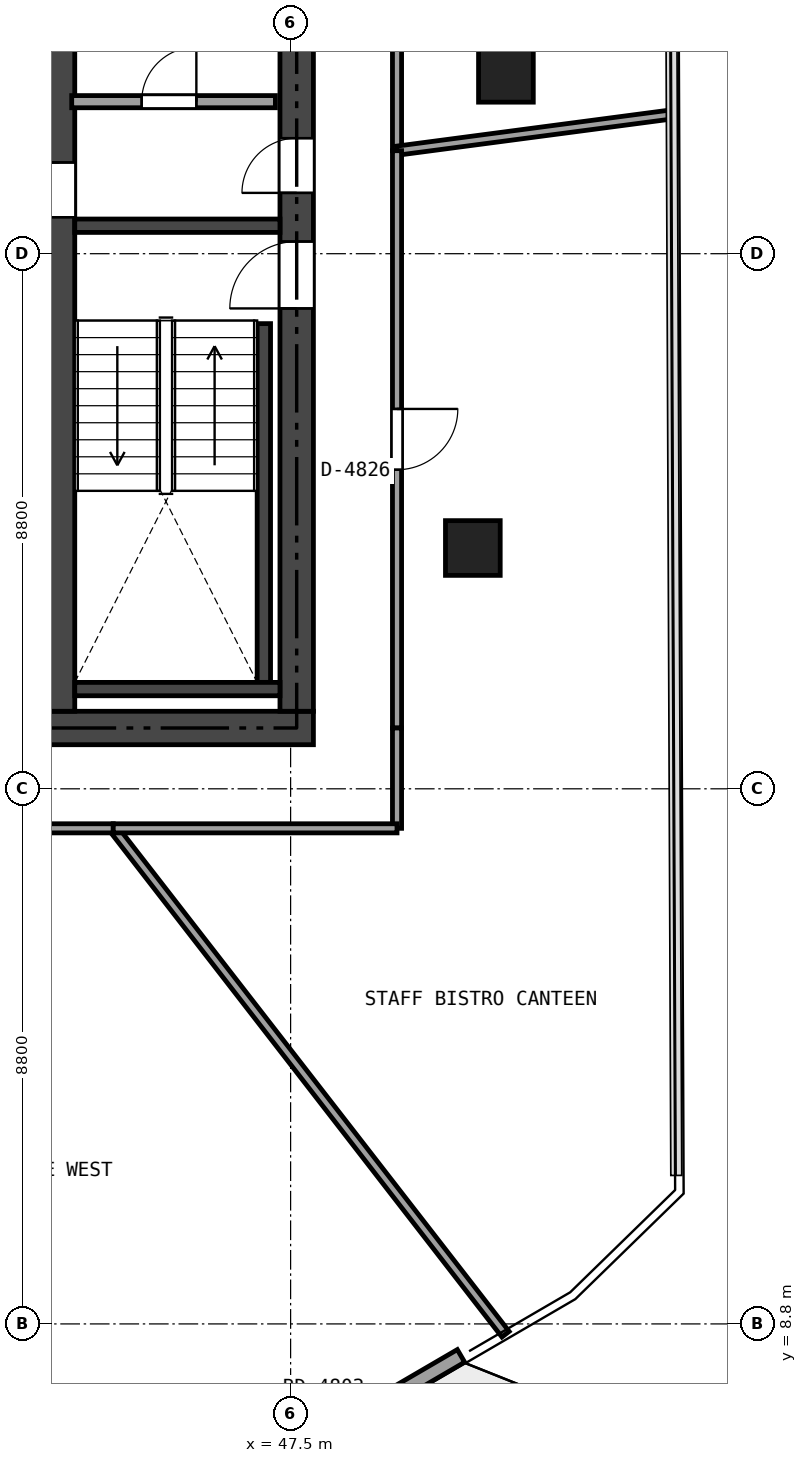
"""IFC4 building model, lengths in metres.
Left out: names, types, materials, properties, quantities, classifications, styles, units other than length and angle.
Written with IfcOpenShell. Run it as: python <this file> out.ifc"""

import sys

from ifc_helpers import new_model, si_unit, direction, frame, frame_2d, origin, origin_2d, place, context, subcontext, project, spatial, rectangle, extrude, element, fill, save


model = new_model("IFC4")
c1 = context("Model", 3, precision=1e-05, world=origin(), true_north=direction((0.0, 1.0)))
c2 = subcontext(c1, "Body", "Model", "MODEL_VIEW")
j1 = project(units=[si_unit("LENGTHUNIT", "METRE"), si_unit("PLANEANGLEUNIT", "RADIAN")], contexts=[c1])
p1 = place(None, origin())
s1 = spatial("IfcSite", under=j1, at=p1, CompositionType="ELEMENT")
p2 = place(p1, origin())
s2 = spatial("IfcBuilding", under=s1, at=p2, CompositionType="ELEMENT")
p3 = place(p2, frame((0.0, 0.0, 180.6)))
s3 = spatial("IfcBuildingStorey", under=s2, at=p3, CompositionType="ELEMENT", Elevation=180.6)
p4 = place(p3, frame((26.525, 18.6, 0.0), z_axis=(0.0, 0.0, 1.0), x_axis=(1.0, 0.0, 0.0)))
e1 = element("IfcWall", 1, at=p4, inside=s3, PredefinedType="SHEAR", context=c2, shape_type="SweptSolid", body=[
    extrude(rectangle(XDim=21.35, YDim=0.55, at=frame_2d((10.675, 0.0))), origin(), (0.0, 0.0, 1.0), 3.32),
])
p5 = place(p4, frame((12.4, 0.0, 0.0)))
e2 = element("IfcOpeningElement", 2, at=p5, cuts=e1, PredefinedType="OPENING", context=c2, shape_type="SweptSolid", body=[
    extrude(rectangle(XDim=1.15, YDim=2.15, at=frame_2d((0.575, 1.075))), frame((0.0, 0.285, 0.0), z_axis=(0.0, -1.0, 0.0), x_axis=(1.0, 0.0, 0.0)), (0.0, 0.0, 1.0), 0.57),
])
p6 = place(p4, frame((5.225, 0.0, 0.0)))
e3 = element("IfcOpeningElement", 3, at=p6, cuts=e1, PredefinedType="OPENING", context=c2, shape_type="SweptSolid", body=[
    extrude(rectangle(XDim=0.9, YDim=2.1, at=frame_2d((0.45, 1.05))), frame((0.0, 0.285, 0.0), z_axis=(0.0, -1.0, 0.0), x_axis=(1.0, 0.0, 0.0)), (0.0, 0.0, 1.0), 0.57),
])
p7 = place(p3, frame((47.6, 18.875, 0.0), z_axis=(0.0, 0.0, 1.0), x_axis=(0.0, 1.0, 0.0)))
e4 = element("IfcWall", 4, at=p7, inside=s3, PredefinedType="SHEAR", context=c2, shape_type="SweptSolid", body=[
    extrude(rectangle(XDim=15.05, YDim=0.55, at=frame_2d((7.525, 0.0))), origin(), (0.0, 0.0, 1.0), 3.32),
])
p8 = place(p7, frame((6.625, 0.0, 0.0)))
e5 = element("IfcOpeningElement", 5, at=p8, cuts=e4, PredefinedType="OPENING", context=c2, shape_type="SweptSolid", body=[
    extrude(rectangle(XDim=1.1, YDim=2.15, at=frame_2d((0.55, 1.075))), frame((0.0, 0.285, 0.0), z_axis=(0.0, -1.0, 0.0), x_axis=(1.0, 0.0, 0.0)), (0.0, 0.0, 1.0), 0.57),
])
p9 = place(p7, frame((8.525, 0.0, 0.0)))
e6 = element("IfcOpeningElement", 6, at=p9, cuts=e4, PredefinedType="OPENING", context=c2, shape_type="SweptSolid", body=[
    extrude(rectangle(XDim=0.9, YDim=2.1, at=frame_2d((0.45, 1.05))), frame((0.0, 0.285, 0.0), z_axis=(0.0, -1.0, 0.0), x_axis=(1.0, 0.0, 0.0)), (0.0, 0.0, 1.0), 0.57),
])
p10 = place(p7, frame((13.175, 0.0, 0.0)))
e7 = element("IfcOpeningElement", 7, at=p10, cuts=e4, PredefinedType="OPENING", context=c2, shape_type="SweptSolid", body=[
    extrude(rectangle(XDim=0.9, YDim=2.1, at=frame_2d((0.45, 1.05))), frame((0.0, 0.285, 0.0), z_axis=(0.0, -1.0, 0.0), x_axis=(1.0, 0.0, 0.0)), (0.0, 0.0, 1.0), 0.57),
])
p11 = place(p3, frame((43.7, 18.875, 0.0), z_axis=(0.0, 0.0, 1.0), x_axis=(0.0, 1.0, 0.0)))
e8 = element("IfcWall", 8, at=p11, inside=s3, PredefinedType="SHEAR", context=c2, shape_type="SweptSolid", body=[
    extrude(rectangle(XDim=15.05, YDim=0.5, at=frame_2d((7.525, 0.0))), origin(), (0.0, 0.0, 1.0), 3.32),
])
p12 = place(p11, frame((8.125, 0.0, 0.0)))
e9 = element("IfcOpeningElement", 9, at=p12, cuts=e8, PredefinedType="OPENING", context=c2, shape_type="SweptSolid", body=[
    extrude(rectangle(XDim=0.9, YDim=2.1, at=frame_2d((0.45, 1.05))), frame((0.0, 0.26, 0.0), z_axis=(0.0, -1.0, 0.0), x_axis=(1.0, 0.0, 0.0)), (0.0, 0.0, 1.0), 0.52),
])
p13 = place(p3, frame((43.95, 26.86, 0.0), z_axis=(0.0, 0.0, 1.0), x_axis=(1.0, 0.0, 0.0)))
e10 = element("IfcWall", 10, at=p13, inside=s3, PredefinedType="SHEAR", context=c2, shape_type="SweptSolid", body=[
    extrude(rectangle(XDim=3.375, YDim=0.22, at=frame_2d((1.688, 0.0))), origin(), (0.0, 0.0, 1.0), 3.32),
])
p14 = place(p3, frame((47.06, 19.35, 0.0), z_axis=(0.0, 0.0, 1.0), x_axis=(0.0, 1.0, 0.0)))
e11 = element("IfcWall", 11, at=p14, inside=s3, PredefinedType="SHEAR", context=c2, shape_type="SweptSolid", body=[
    extrude(rectangle(XDim=5.9, YDim=0.22, at=frame_2d((2.95, 0.0))), origin(), (0.0, 0.0, 1.0), 3.32),
])
p15 = place(p3, frame((43.95, 19.24, 0.0), z_axis=(0.0, 0.0, 1.0), x_axis=(1.0, 0.0, 0.0)))
e12 = element("IfcWall", 12, at=p15, inside=s3, PredefinedType="SHEAR", context=c2, shape_type="SweptSolid", body=[
    extrude(rectangle(XDim=3.375, YDim=0.22, at=frame_2d((1.688, 0.0))), origin(), (0.0, 0.0, 1.0), 3.32),
])
for number, where, z_axis, x_axis in (
    (13, (51.041, 29.342, 0.0), (0.0, 0.0, 1.0), (1.0, 0.0, 0.0)),
    (14, (50.497, 21.56, 0.0), (0.0, 0.0, 1.0), (1.0, 0.0, 0.0)),
):
    element("IfcColumn", number, at=place(p3, frame(where, z_axis=z_axis, x_axis=x_axis)), inside=s3, PredefinedType="COLUMN", context=c2, shape_type="SweptSolid", body=[
        extrude(rectangle(XDim=0.9, YDim=0.9, at=origin_2d()), origin(), (0.0, 0.0, 1.0), 3.32),
    ])
p16 = place(p3, frame((50.302, 8.274, 0.0), z_axis=(0.0, 0.0, 1.0), x_axis=(-0.863902826637, -0.50365852135, 0.0)))
e15 = element("IfcWall", 15, at=p16, inside=s3, PredefinedType="SOLIDWALL", context=c2, shape_type="SweptSolid", body=[
    extrude(rectangle(XDim=4.0, YDim=0.24, at=frame_2d((2.0, 0.0))), origin(), (0.0, 0.0, 1.0), 3.32),
])
p17 = place(p16, frame((1.5, 0.0, 0.0)))
e16 = element("IfcOpeningElement", 16, at=p17, cuts=e15, PredefinedType="OPENING", context=c2, shape_type="SweptSolid", body=[
    extrude(rectangle(XDim=1.0, YDim=2.15, at=frame_2d((0.5, 1.075))), frame((0.0, 0.13, 0.0), z_axis=(0.0, -1.0, 0.0), x_axis=(1.0, 0.0, 0.0)), (0.0, 0.0, 1.0), 0.26),
])
p18 = place(p3, frame((43.9, 28.9, 0.0), z_axis=(0.0, 0.0, 1.0), x_axis=(1.0, 0.0, 0.0)))
e17 = element("IfcWall", 17, at=p18, inside=s3, PredefinedType="SOLIDWALL", context=c2, shape_type="SweptSolid", body=[
    extrude(rectangle(XDim=3.35, YDim=0.2, at=frame_2d((1.675, 0.0))), origin(), (0.0, 0.0, 1.0), 3.32),
])
p19 = place(p18, frame((1.15, 0.0, 0.0)))
e18 = element("IfcOpeningElement", 18, at=p19, cuts=e17, PredefinedType="OPENING", context=c2, shape_type="SweptSolid", body=[
    extrude(rectangle(XDim=0.9, YDim=2.1, at=frame_2d((0.45, 1.05))), frame((0.0, 0.11, 0.0), z_axis=(0.0, -1.0, 0.0), x_axis=(1.0, 0.0, 0.0)), (0.0, 0.0, 1.0), 0.22),
])
p20 = place(p3, frame((49.25, 34.2, 0.0), z_axis=(0.0, 0.0, 1.0), x_axis=(0.0, -1.0, 0.0)))
e19 = element("IfcWall", 19, at=p20, inside=s3, PredefinedType="PARTITIONING", context=c2, shape_type="SweptSolid", body=[
    extrude(rectangle(XDim=6.106, YDim=0.15, at=frame_2d((3.053, 0.0))), origin(), (0.0, 0.0, 1.0), 2.697),
])
p21 = place(p20, frame((2.553, 0.0, 0.0)))
e20 = element("IfcOpeningElement", 20, at=p21, cuts=e19, PredefinedType="OPENING", context=c2, shape_type="SweptSolid", body=[
    extrude(rectangle(XDim=1.0, YDim=2.15, at=frame_2d((0.5, 1.075))), frame((0.0, 0.085, 0.0), z_axis=(0.0, -1.0, 0.0), x_axis=(1.0, 0.0, 0.0)), (0.0, 0.0, 1.0), 0.17),
])
p22 = place(p3, frame((49.25, 28.094, 0.0), z_axis=(0.0, 0.0, 1.0), x_axis=(0.991396749082, 0.130891122349, 0.0)))
e21 = element("IfcWall", 21, at=p22, inside=s3, PredefinedType="PARTITIONING", context=c2, shape_type="SweptSolid", body=[
    extrude(rectangle(XDim=4.6, YDim=0.15, at=frame_2d((2.3, 0.0))), origin(), (0.0, 0.0, 1.0), 2.905),
])
p23 = place(p3, frame((51.035, 8.63, 0.0), z_axis=(0.0, 0.0, 1.0), x_axis=(-0.612800173813, 0.790237905301, 0.0)))
e22 = element("IfcWall", 22, at=p23, inside=s3, PredefinedType="PARTITIONING", context=c2, shape_type="SweptSolid", body=[
    extrude(rectangle(XDim=10.529, YDim=0.15, at=frame_2d((5.264, 0.0))), origin(), (0.0, 0.0, 1.0), 2.841),
])
p24 = place(p3, frame((44.583, 16.95, 0.0), z_axis=(0.0, 0.0, 1.0), x_axis=(-1.0, 0.0, 0.0)))
e23 = element("IfcWall", 23, at=p24, inside=s3, PredefinedType="PARTITIONING", context=c2, shape_type="SweptSolid", body=[
    extrude(rectangle(XDim=10.093, YDim=0.15, at=frame_2d((5.046, 0.0))), origin(), (0.0, 0.0, 1.0), 2.697),
])
p25 = place(p24, frame((4.546, 0.0, 0.0)))
e24 = element("IfcOpeningElement", 24, at=p25, cuts=e23, PredefinedType="OPENING", context=c2, shape_type="SweptSolid", body=[
    extrude(rectangle(XDim=1.0, YDim=2.15, at=frame_2d((0.5, 1.075))), frame((0.0, 0.085, 0.0), z_axis=(0.0, -1.0, 0.0), x_axis=(1.0, 0.0, 0.0)), (0.0, 0.0, 1.0), 0.17),
])
p26 = place(p3, frame((49.25, 28.094, 0.0), z_axis=(0.0, 0.0, 1.0), x_axis=(0.0, -1.0, 0.0)))
e25 = element("IfcWall", 25, at=p26, inside=s3, PredefinedType="PARTITIONING", context=c2, shape_type="SweptSolid", body=[
    extrude(rectangle(XDim=9.494, YDim=0.15, at=frame_2d((4.747, 0.0))), origin(), (0.0, 0.0, 1.0), 2.697),
])
p27 = place(p26, frame((4.247, 0.0, 0.0)))
e26 = element("IfcOpeningElement", 26, at=p27, cuts=e25, PredefinedType="OPENING", context=c2, shape_type="SweptSolid", body=[
    extrude(rectangle(XDim=1.0, YDim=2.15, at=frame_2d((0.5, 1.075))), frame((0.0, 0.085, 0.0), z_axis=(0.0, -1.0, 0.0), x_axis=(1.0, 0.0, 0.0)), (0.0, 0.0, 1.0), 0.17),
])
p28 = place(p3, frame((49.25, 18.6, 0.0), z_axis=(0.0, 0.0, 1.0), x_axis=(0.0, -1.0, 0.0)))
e27 = element("IfcWall", 27, at=p28, inside=s3, PredefinedType="PARTITIONING", context=c2, shape_type="SweptSolid", body=[
    extrude(rectangle(XDim=1.65, YDim=0.15, at=frame_2d((0.825, 0.0))), origin(), (0.0, 0.0, 1.0), 3.32),
])
p29 = place(p3, frame((49.25, 16.95, 0.0), z_axis=(0.0, 0.0, 1.0), x_axis=(-1.0, 0.0, 0.0)))
e28 = element("IfcWall", 28, at=p29, inside=s3, PredefinedType="PARTITIONING", context=c2, shape_type="SweptSolid", body=[
    extrude(rectangle(XDim=4.667, YDim=0.15, at=frame_2d((2.333, 0.0))), origin(), (0.0, 0.0, 1.0), 2.841),
])
p30 = place(p8, origin())
e29 = element("IfcDoor", 29, at=p30, inside=s3, OperationType="SINGLE_SWING_LEFT", PredefinedType="DOOR", context=c2, shape_type="SweptSolid", body=[
    extrude(rectangle(XDim=1.1, YDim=2.15, at=frame_2d((0.55, 1.075))), frame((0.0, 0.025, 0.0), z_axis=(0.0, -1.0, 0.0), x_axis=(1.0, 0.0, 0.0)), (0.0, 0.0, 1.0), 0.05),
])
fill(e5, e29)
p31 = place(p12, origin())
e30 = element("IfcDoor", 30, at=p31, inside=s3, OperationType="SINGLE_SWING_RIGHT", PredefinedType="DOOR", context=c2, shape_type="SweptSolid", body=[
    extrude(rectangle(XDim=0.9, YDim=2.1, at=frame_2d((0.45, 1.05))), frame((0.0, 0.025, 0.0), z_axis=(0.0, -1.0, 0.0), x_axis=(1.0, 0.0, 0.0)), (0.0, 0.0, 1.0), 0.05),
])
fill(e9, e30)
p32 = place(p9, origin())
e31 = element("IfcDoor", 31, at=p32, inside=s3, OperationType="SINGLE_SWING_LEFT", PredefinedType="DOOR", context=c2, shape_type="SweptSolid", body=[
    extrude(rectangle(XDim=0.9, YDim=2.1, at=frame_2d((0.45, 1.05))), frame((0.0, 0.025, 0.0), z_axis=(0.0, -1.0, 0.0), x_axis=(1.0, 0.0, 0.0)), (0.0, 0.0, 1.0), 0.05),
])
fill(e6, e31)
p33 = place(p19, origin())
e32 = element("IfcDoor", 32, at=p33, inside=s3, OperationType="SINGLE_SWING_RIGHT", PredefinedType="DOOR", context=c2, shape_type="SweptSolid", body=[
    extrude(rectangle(XDim=0.9, YDim=2.1, at=frame_2d((0.45, 1.05))), frame((0.0, 0.025, 0.0), z_axis=(0.0, -1.0, 0.0), x_axis=(1.0, 0.0, 0.0)), (0.0, 0.0, 1.0), 0.05),
])
fill(e18, e32)
p34 = place(p27, origin())
e33 = element("IfcDoor", 33, at=p34, inside=s3, OperationType="SINGLE_SWING_LEFT", PredefinedType="DOOR", context=c2, shape_type="SweptSolid", body=[
    extrude(rectangle(XDim=1.0, YDim=2.15, at=frame_2d((0.5, 1.075))), frame((0.0, 0.025, 0.0), z_axis=(0.0, -1.0, 0.0), x_axis=(1.0, 0.0, 0.0)), (0.0, 0.0, 1.0), 0.05),
])
fill(e26, e33)
save(model, sys.argv[1])
